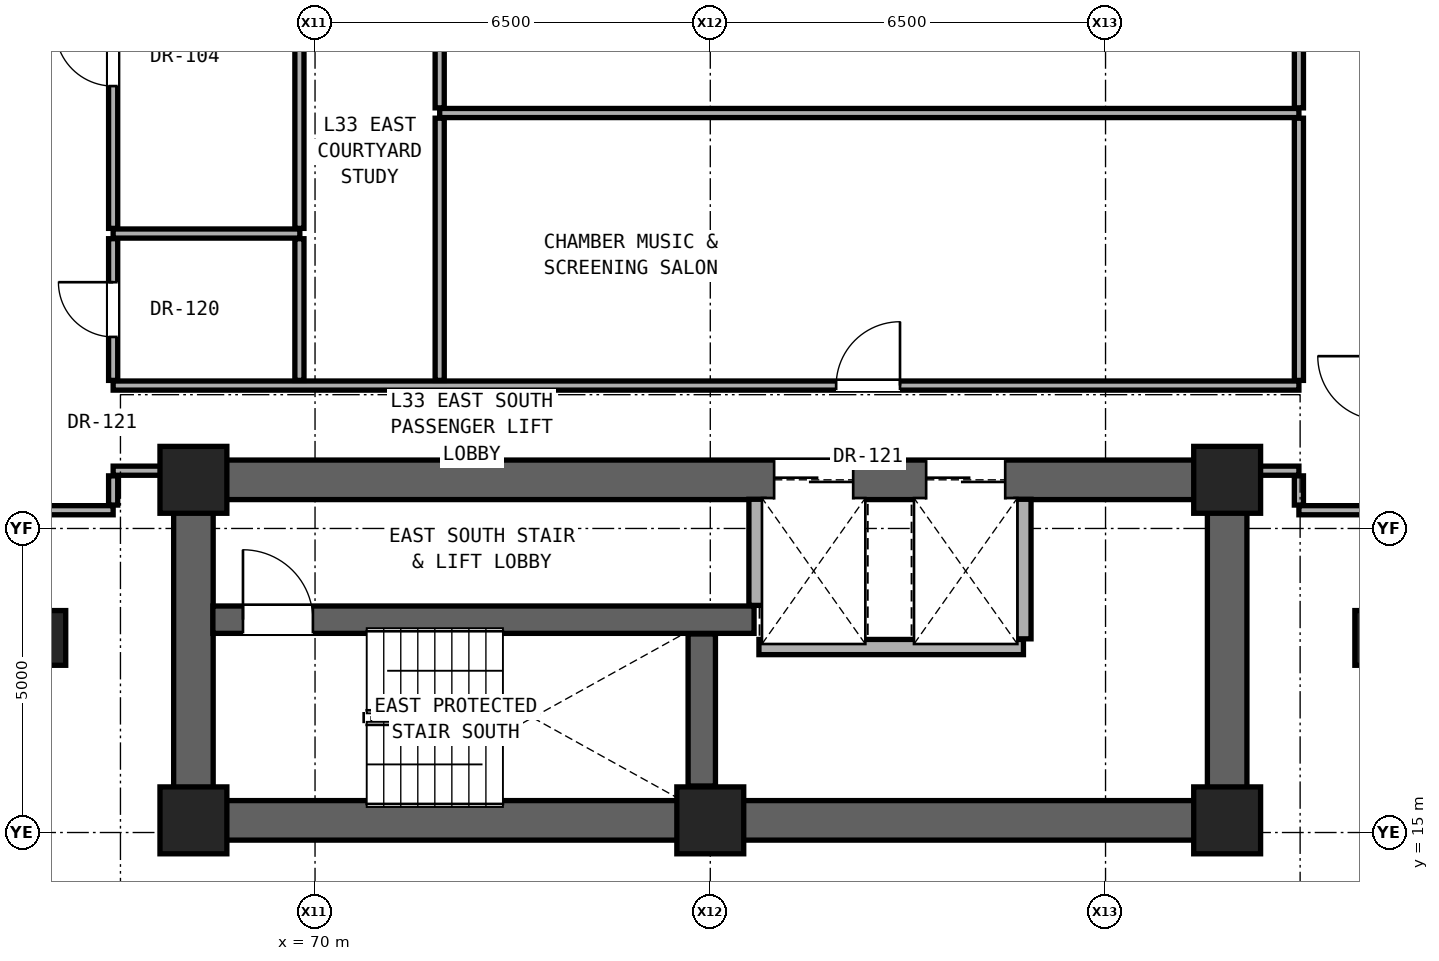
"""IFC4 building model, lengths in metres.
Left out: names, types, materials, properties, quantities, classifications, styles, units other than length and angle.
Written with IfcOpenShell. Run it as: python <this file> out.ifc"""

import sys

from ifc_helpers import new_model, si_unit, direction, frame, frame_2d, origin, origin_2d, place, context, subcontext, project, spatial, rectangle, extrude, element, fill, save


model = new_model("IFC4")
c1 = context("Model", 3, precision=1e-05, world=origin(), true_north=direction((0.0, 1.0)))
c2 = subcontext(c1, "Body", "Model", "MODEL_VIEW")
j1 = project(units=[si_unit("LENGTHUNIT", "METRE"), si_unit("PLANEANGLEUNIT", "RADIAN")], contexts=[c1])
p1 = place(None, origin())
s1 = spatial("IfcSite", under=j1, at=p1, CompositionType="ELEMENT")
p2 = place(p1, origin())
s2 = spatial("IfcBuilding", under=s1, at=p2, CompositionType="ELEMENT")
p3 = place(p2, frame((0.0, 0.0, 118.1)))
s3 = spatial("IfcBuildingStorey", under=s2, at=p3, CompositionType="ELEMENT", Elevation=118.1)
for number, where, z_axis, x_axis in (
    (1, (68.0, 15.2, 0.0), (0.0, 0.0, 1.0), (1.0, 0.0, 0.0)),
    (2, (76.5, 15.2, 0.0), (0.0, 0.0, 1.0), (1.0, 0.0, 0.0)),
    (3, (85.0, 15.2, 0.0), (0.0, 0.0, 1.0), (1.0, 0.0, 0.0)),
    (4, (68.0, 20.8, 0.0), (0.0, 0.0, 1.0), (1.0, 0.0, 0.0)),
    (5, (85.0, 20.8, 0.0), (0.0, 0.0, 1.0), (1.0, 0.0, 0.0)),
):
    element("IfcColumn", number, at=place(p3, frame(where, z_axis=z_axis, x_axis=x_axis)), inside=s3, PredefinedType="COLUMN", context=c2, shape_type="SweptSolid", body=[
        extrude(rectangle(XDim=1.1, YDim=1.1, at=origin_2d()), origin(), (0.0, 0.0, 1.0), 3.3),
    ])
for number, where, z_axis, x_axis in (
    (6, (65.6, 18.2, 0.0), (0.0, 0.0, 1.0), (1.0, 0.0, 0.0)),
    (7, (87.4, 18.2, 0.0), (0.0, 0.0, 1.0), (1.0, 0.0, 0.0)),
):
    element("IfcColumn", number, at=place(p3, frame(where, z_axis=z_axis, x_axis=x_axis)), inside=s3, PredefinedType="PILASTER", context=c2, shape_type="SweptSolid", body=[
        extrude(rectangle(XDim=0.6, YDim=0.9, at=origin_2d()), origin(), (0.0, 0.0, 1.0), 3.3),
    ])
p4 = place(p3, frame((68.0, 15.2, 0.0), z_axis=(0.0, 0.0, 1.0), x_axis=(1.0, 0.0, 0.0)))
e8 = element("IfcWall", 8, at=p4, inside=s3, PredefinedType="SHEAR", context=c2, shape_type="SweptSolid", body=[
    extrude(rectangle(XDim=17.0, YDim=0.65, at=frame_2d((8.5, 0.0))), origin(), (0.0, 0.0, 1.0), 3.08),
])
for number, where, z_axis, x_axis in (
    (9, (68.0, 15.2, 0.0), (0.0, 0.0, 1.0), (0.0, 1.0, 0.0)),
    (10, (85.0, 15.2, 0.0), (0.0, 0.0, 1.0), (0.0, 1.0, 0.0)),
):
    element("IfcWall", number, at=place(p3, frame(where, z_axis=z_axis, x_axis=x_axis)), inside=s3, PredefinedType="SHEAR", context=c2, shape_type="SweptSolid", body=[
        extrude(rectangle(XDim=5.6, YDim=0.65, at=frame_2d((2.8, 0.0))), origin(), (0.0, 0.0, 1.0), 3.08),
    ])
p5 = place(p3, frame((68.0, 20.8, 0.0), z_axis=(0.0, 0.0, 1.0), x_axis=(1.0, 0.0, 0.0)))
e11 = element("IfcWall", 11, at=p5, inside=s3, PredefinedType="SHEAR", context=c2, shape_type="SweptSolid", body=[
    extrude(rectangle(XDim=17.0, YDim=0.65, at=frame_2d((8.5, 0.0))), origin(), (0.0, 0.0, 1.0), 3.08),
])
p6 = place(p5, frame((9.55, 0.0, 0.0)))
e12 = element("IfcOpeningElement", 12, at=p6, cuts=e11, PredefinedType="OPENING", context=c2, shape_type="SweptSolid", body=[
    extrude(rectangle(XDim=1.3, YDim=2.3, at=frame_2d((0.65, 1.15))), frame((0.0, 0.335, 0.0), z_axis=(0.0, -1.0, 0.0), x_axis=(1.0, 0.0, 0.0)), (0.0, 0.0, 1.0), 0.67),
])
p7 = place(p5, frame((12.05, 0.0, 0.0)))
e13 = element("IfcOpeningElement", 13, at=p7, cuts=e11, PredefinedType="OPENING", context=c2, shape_type="SweptSolid", body=[
    extrude(rectangle(XDim=1.3, YDim=2.3, at=frame_2d((0.65, 1.15))), frame((0.0, 0.335, 0.0), z_axis=(0.0, -1.0, 0.0), x_axis=(1.0, 0.0, 0.0)), (0.0, 0.0, 1.0), 0.67),
])
p8 = place(p3, frame((77.3, 18.05, 0.0), z_axis=(0.0, 0.0, 1.0), x_axis=(1.0, 0.0, 0.0)))
e14 = element("IfcWall", 14, at=p8, inside=s3, PredefinedType="SOLIDWALL", context=c2, shape_type="SweptSolid", body=[
    extrude(rectangle(XDim=4.35, YDim=0.25, at=frame_2d((2.175, 0.0))), origin(), (0.0, 0.0, 1.0), 3.08),
])
p9 = place(p3, frame((68.32, 18.5, 0.0), z_axis=(0.0, 0.0, 1.0), x_axis=(1.0, 0.0, 0.0)))
e15 = element("IfcWall", 15, at=p9, inside=s3, PredefinedType="SHEAR", context=c2, shape_type="SweptSolid", body=[
    extrude(rectangle(XDim=8.9, YDim=0.45, at=frame_2d((4.45, 0.0))), origin(), (0.0, 0.0, 1.0), 3.08),
])
p10 = place(p9, frame((0.495, 0.0, 0.0)))
e16 = element("IfcOpeningElement", 16, at=p10, cuts=e15, PredefinedType="OPENING", context=c2, shape_type="SweptSolid", body=[
    extrude(rectangle(XDim=1.15, YDim=2.2, at=frame_2d((0.575, 1.1))), frame((0.0, 0.235, 0.0), z_axis=(0.0, -1.0, 0.0), x_axis=(1.0, 0.0, 0.0)), (0.0, 0.0, 1.0), 0.47),
])
p11 = place(p3, frame((65.32, 20.3, 0.0), z_axis=(0.0, 0.0, 1.0), x_axis=(1.0, 0.0, 0.0)))
e17 = element("IfcWall", 17, at=p11, inside=s3, PredefinedType="PARTITIONING", context=c2, shape_type="SweptSolid", body=[
    extrude(rectangle(XDim=1.36, YDim=0.15, at=frame_2d((0.68, 0.0))), origin(), (0.0, 0.0, 1.0), 3.08),
])
p12 = place(p3, frame((86.18, 20.3, 0.0), z_axis=(0.0, 0.0, 1.0), x_axis=(1.0, 0.0, 0.0)))
e18 = element("IfcWall", 18, at=p12, inside=s3, PredefinedType="PARTITIONING", context=c2, shape_type="SweptSolid", body=[
    extrude(rectangle(XDim=1.36, YDim=0.15, at=frame_2d((0.68, 0.0))), origin(), (0.0, 0.0, 1.0), 3.08),
])
p13 = place(p3, frame((66.68, 20.95, 0.0), z_axis=(0.0, 0.0, 1.0), x_axis=(1.0, 0.0, 0.0)))
e19 = element("IfcWall", 19, at=p13, inside=s3, PredefinedType="PARTITIONING", context=c2, shape_type="SweptSolid", body=[
    extrude(rectangle(XDim=1.0, YDim=0.15, at=frame_2d((0.5, 0.0))), origin(), (0.0, 0.0, 1.0), 2.472),
])
p14 = place(p3, frame((85.32, 20.95, 0.0), z_axis=(0.0, 0.0, 1.0), x_axis=(1.0, 0.0, 0.0)))
e20 = element("IfcWall", 20, at=p14, inside=s3, PredefinedType="PARTITIONING", context=c2, shape_type="SweptSolid", body=[
    extrude(rectangle(XDim=0.86, YDim=0.15, at=frame_2d((0.43, 0.0))), origin(), (0.0, 0.0, 1.0), 2.472),
])
p15 = place(p3, frame((66.68, 22.35, 0.0), z_axis=(0.0, 0.0, 1.0), x_axis=(1.0, 0.0, 0.0)))
e21 = element("IfcWall", 21, at=p15, inside=s3, PredefinedType="PARTITIONING", context=c2, shape_type="SweptSolid", body=[
    extrude(rectangle(XDim=19.5, YDim=0.15, at=frame_2d((9.75, 0.0))), origin(), (0.0, 0.0, 1.0), 2.216),
])
p16 = place(p15, frame((11.89, 0.0, 0.0)))
e22 = element("IfcOpeningElement", 22, at=p16, cuts=e21, PredefinedType="OPENING", context=c2, shape_type="SweptSolid", body=[
    extrude(rectangle(XDim=1.05, YDim=2.2, at=frame_2d((0.525, 1.1))), frame((0.0, 0.085, 0.0), z_axis=(0.0, -1.0, 0.0), x_axis=(1.0, 0.0, 0.0)), (0.0, 0.0, 1.0), 0.17),
])
p17 = place(p3, frame((66.68, 24.85, 0.0), z_axis=(0.0, 0.0, 1.0), x_axis=(1.0, 0.0, 0.0)))
e23 = element("IfcWall", 23, at=p17, inside=s3, PredefinedType="PARTITIONING", context=c2, shape_type="SweptSolid", body=[
    extrude(rectangle(XDim=3.07, YDim=0.15, at=frame_2d((1.535, 0.0))), origin(), (0.0, 0.0, 1.0), 2.216),
])
p18 = place(p3, frame((72.05, 26.832, 0.0), z_axis=(0.0, 0.0, 1.0), x_axis=(1.0, 0.0, 0.0)))
e24 = element("IfcWall", 24, at=p18, inside=s3, PredefinedType="PARTITIONING", context=c2, shape_type="SweptSolid", body=[
    extrude(rectangle(XDim=14.13, YDim=0.15, at=frame_2d((7.065, 0.0))), origin(), (0.0, 0.0, 1.0), 2.216),
])
p19 = place(p3, frame((66.68, 20.385, 0.0), z_axis=(0.0, 0.0, 1.0), x_axis=(0.0, 1.0, 0.0)))
e25 = element("IfcWall", 25, at=p19, inside=s3, PredefinedType="PARTITIONING", context=c2, shape_type="SweptSolid", body=[
    extrude(rectangle(XDim=0.48, YDim=0.15, at=frame_2d((0.24, 0.0))), origin(), (0.0, 0.0, 1.0), 2.472),
])
p20 = place(p3, frame((66.68, 22.435, 0.0), z_axis=(0.0, 0.0, 1.0), x_axis=(0.0, 1.0, 0.0)))
e26 = element("IfcWall", 26, at=p20, inside=s3, PredefinedType="PARTITIONING", context=c2, shape_type="SweptSolid", body=[
    extrude(rectangle(XDim=2.33, YDim=0.15, at=frame_2d((1.165, 0.0))), origin(), (0.0, 0.0, 1.0), 3.08),
])
p21 = place(p20, frame((0.715, 0.0, 0.0)))
e27 = element("IfcOpeningElement", 27, at=p21, cuts=e26, PredefinedType="OPENING", context=c2, shape_type="SweptSolid", body=[
    extrude(rectangle(XDim=0.9, YDim=2.1, at=frame_2d((0.45, 1.05))), frame((0.0, 0.085, 0.0), z_axis=(0.0, -1.0, 0.0), x_axis=(1.0, 0.0, 0.0)), (0.0, 0.0, 1.0), 0.17),
])
p22 = place(p3, frame((66.68, 24.935, 0.0), z_axis=(0.0, 0.0, 1.0), x_axis=(0.0, 1.0, 0.0)))
e28 = element("IfcWall", 28, at=p22, inside=s3, PredefinedType="PARTITIONING", context=c2, shape_type="SweptSolid", body=[
    extrude(rectangle(XDim=5.63, YDim=0.15, at=frame_2d((2.815, 0.0))), origin(), (0.0, 0.0, 1.0), 2.376),
])
p23 = place(p22, frame((2.34, 0.0, 0.0)))
e29 = element("IfcOpeningElement", 29, at=p23, cuts=e28, PredefinedType="OPENING", context=c2, shape_type="SweptSolid", body=[
    extrude(rectangle(XDim=0.95, YDim=2.15, at=frame_2d((0.475, 1.075))), frame((0.0, 0.085, 0.0), z_axis=(0.0, -1.0, 0.0), x_axis=(1.0, 0.0, 0.0)), (0.0, 0.0, 1.0), 0.17),
])
p24 = place(p3, frame((69.743, 22.435, 0.0), z_axis=(0.0, 0.0, 1.0), x_axis=(0.0, 1.0, 0.0)))
e30 = element("IfcWall", 30, at=p24, inside=s3, PredefinedType="PARTITIONING", context=c2, shape_type="SweptSolid", body=[
    extrude(rectangle(XDim=2.33, YDim=0.15, at=frame_2d((1.165, 0.0))), origin(), (0.0, 0.0, 1.0), 3.08),
])
p25 = place(p3, frame((69.743, 24.935, 0.0), z_axis=(0.0, 0.0, 1.0), x_axis=(0.0, 1.0, 0.0)))
e31 = element("IfcWall", 31, at=p25, inside=s3, PredefinedType="PARTITIONING", context=c2, shape_type="SweptSolid", body=[
    extrude(rectangle(XDim=5.63, YDim=0.15, at=frame_2d((2.815, 0.0))), origin(), (0.0, 0.0, 1.0), 2.216),
])
p26 = place(p3, frame((72.05, 22.435, 0.0), z_axis=(0.0, 0.0, 1.0), x_axis=(0.0, 1.0, 0.0)))
e32 = element("IfcWall", 32, at=p26, inside=s3, PredefinedType="PARTITIONING", context=c2, shape_type="SweptSolid", body=[
    extrude(rectangle(XDim=4.312, YDim=0.15, at=frame_2d((2.156, 0.0))), origin(), (0.0, 0.0, 1.0), 3.08),
])
p27 = place(p3, frame((72.05, 26.917, 0.0), z_axis=(0.0, 0.0, 1.0), x_axis=(0.0, 1.0, 0.0)))
e33 = element("IfcWall", 33, at=p27, inside=s3, PredefinedType="PARTITIONING", context=c2, shape_type="SweptSolid", body=[
    extrude(rectangle(XDim=3.648, YDim=0.15, at=frame_2d((1.824, 0.0))), origin(), (0.0, 0.0, 1.0), 2.216),
])
p28 = place(p3, frame((76.36, 15.765, 0.0), z_axis=(0.0, 0.0, 1.0), x_axis=(0.0, 1.0, 0.0)))
e34 = element("IfcWall", 34, at=p28, inside=s3, PredefinedType="SHEAR", context=c2, shape_type="SweptSolid", body=[
    extrude(rectangle(XDim=2.5, YDim=0.45, at=frame_2d((1.25, 0.0))), origin(), (0.0, 0.0, 1.0), 3.08),
])
p29 = place(p3, frame((77.26, 18.735, 0.0), z_axis=(0.0, 0.0, 1.0), x_axis=(0.0, 1.0, 0.0)))
e35 = element("IfcWall", 35, at=p29, inside=s3, PredefinedType="SOLIDWALL", context=c2, shape_type="SweptSolid", body=[
    extrude(rectangle(XDim=1.745, YDim=0.25, at=frame_2d((0.873, 0.0))), origin(), (0.0, 0.0, 1.0), 3.08),
])
p30 = place(p3, frame((81.65, 18.185, 0.0), z_axis=(0.0, 0.0, 1.0), x_axis=(0.0, 1.0, 0.0)))
e36 = element("IfcWall", 36, at=p30, inside=s3, PredefinedType="SOLIDWALL", context=c2, shape_type="SweptSolid", body=[
    extrude(rectangle(XDim=2.295, YDim=0.25, at=frame_2d((1.147, 0.0))), origin(), (0.0, 0.0, 1.0), 3.08),
])
p31 = place(p3, frame((86.18, 20.385, 0.0), z_axis=(0.0, 0.0, 1.0), x_axis=(0.0, 1.0, 0.0)))
e37 = element("IfcWall", 37, at=p31, inside=s3, PredefinedType="PARTITIONING", context=c2, shape_type="SweptSolid", body=[
    extrude(rectangle(XDim=0.48, YDim=0.15, at=frame_2d((0.24, 0.0))), origin(), (0.0, 0.0, 1.0), 2.472),
])
p32 = place(p3, frame((86.18, 22.435, 0.0), z_axis=(0.0, 0.0, 1.0), x_axis=(0.0, 1.0, 0.0)))
e38 = element("IfcWall", 38, at=p32, inside=s3, PredefinedType="PARTITIONING", context=c2, shape_type="SweptSolid", body=[
    extrude(rectangle(XDim=4.312, YDim=0.15, at=frame_2d((2.156, 0.0))), origin(), (0.0, 0.0, 1.0), 3.08),
])
p33 = place(p3, frame((86.18, 26.917, 0.0), z_axis=(0.0, 0.0, 1.0), x_axis=(0.0, 1.0, 0.0)))
e39 = element("IfcWall", 39, at=p33, inside=s3, PredefinedType="PARTITIONING", context=c2, shape_type="SweptSolid", body=[
    extrude(rectangle(XDim=3.648, YDim=0.15, at=frame_2d((1.824, 0.0))), origin(), (0.0, 0.0, 1.0), 2.376),
])
p34 = place(p10, origin())
e40 = element("IfcDoor", 40, at=p34, inside=s3, OperationType="SINGLE_SWING_LEFT", PredefinedType="DOOR", context=c2, shape_type="SweptSolid", body=[
    extrude(rectangle(XDim=1.15, YDim=2.2, at=frame_2d((0.575, 1.1))), frame((0.0, 0.025, 0.0), z_axis=(0.0, -1.0, 0.0), x_axis=(1.0, 0.0, 0.0)), (0.0, 0.0, 1.0), 0.05),
])
fill(e16, e40)
p35 = place(p21, origin())
e41 = element("IfcDoor", 41, at=p35, inside=s3, OperationType="SINGLE_SWING_RIGHT", PredefinedType="DOOR", context=c2, shape_type="SweptSolid", body=[
    extrude(rectangle(XDim=0.9, YDim=2.1, at=frame_2d((0.45, 1.05))), frame((0.0, 0.025, 0.0), z_axis=(0.0, -1.0, 0.0), x_axis=(1.0, 0.0, 0.0)), (0.0, 0.0, 1.0), 0.05),
])
fill(e27, e41)
p36 = place(p23, origin())
e42 = element("IfcDoor", 42, at=p36, inside=s3, OperationType="SINGLE_SWING_RIGHT", PredefinedType="DOOR", context=c2, shape_type="SweptSolid", body=[
    extrude(rectangle(XDim=0.95, YDim=2.15, at=frame_2d((0.475, 1.075))), frame((0.0, 0.025, 0.0), z_axis=(0.0, -1.0, 0.0), x_axis=(1.0, 0.0, 0.0)), (0.0, 0.0, 1.0), 0.05),
])
fill(e29, e42)
p37 = place(p16, origin())
e43 = element("IfcDoor", 43, at=p37, inside=s3, OperationType="SINGLE_SWING_RIGHT", PredefinedType="DOOR", context=c2, shape_type="SweptSolid", body=[
    extrude(rectangle(XDim=1.05, YDim=2.2, at=frame_2d((0.525, 1.1))), frame((0.0, 0.025, 0.0), z_axis=(0.0, -1.0, 0.0), x_axis=(1.0, 0.0, 0.0)), (0.0, 0.0, 1.0), 0.05),
])
fill(e22, e43)
p38 = place(p6, origin())
e44 = element("IfcDoor", 44, at=p38, inside=s3, OperationType="DOUBLE_DOOR_SLIDING", PredefinedType="DOOR", context=c2, shape_type="SweptSolid", body=[
    extrude(rectangle(XDim=1.3, YDim=2.3, at=frame_2d((0.65, 1.15))), frame((0.0, 0.025, 0.0), z_axis=(0.0, -1.0, 0.0), x_axis=(1.0, 0.0, 0.0)), (0.0, 0.0, 1.0), 0.05),
])
fill(e12, e44)
p39 = place(p7, origin())
e45 = element("IfcDoor", 45, at=p39, inside=s3, OperationType="DOUBLE_DOOR_SLIDING", PredefinedType="DOOR", context=c2, shape_type="SweptSolid", body=[
    extrude(rectangle(XDim=1.3, YDim=2.3, at=frame_2d((0.65, 1.15))), frame((0.0, 0.025, 0.0), z_axis=(0.0, -1.0, 0.0), x_axis=(1.0, 0.0, 0.0)), (0.0, 0.0, 1.0), 0.05),
])
fill(e13, e45)
save(model, sys.argv[1])
